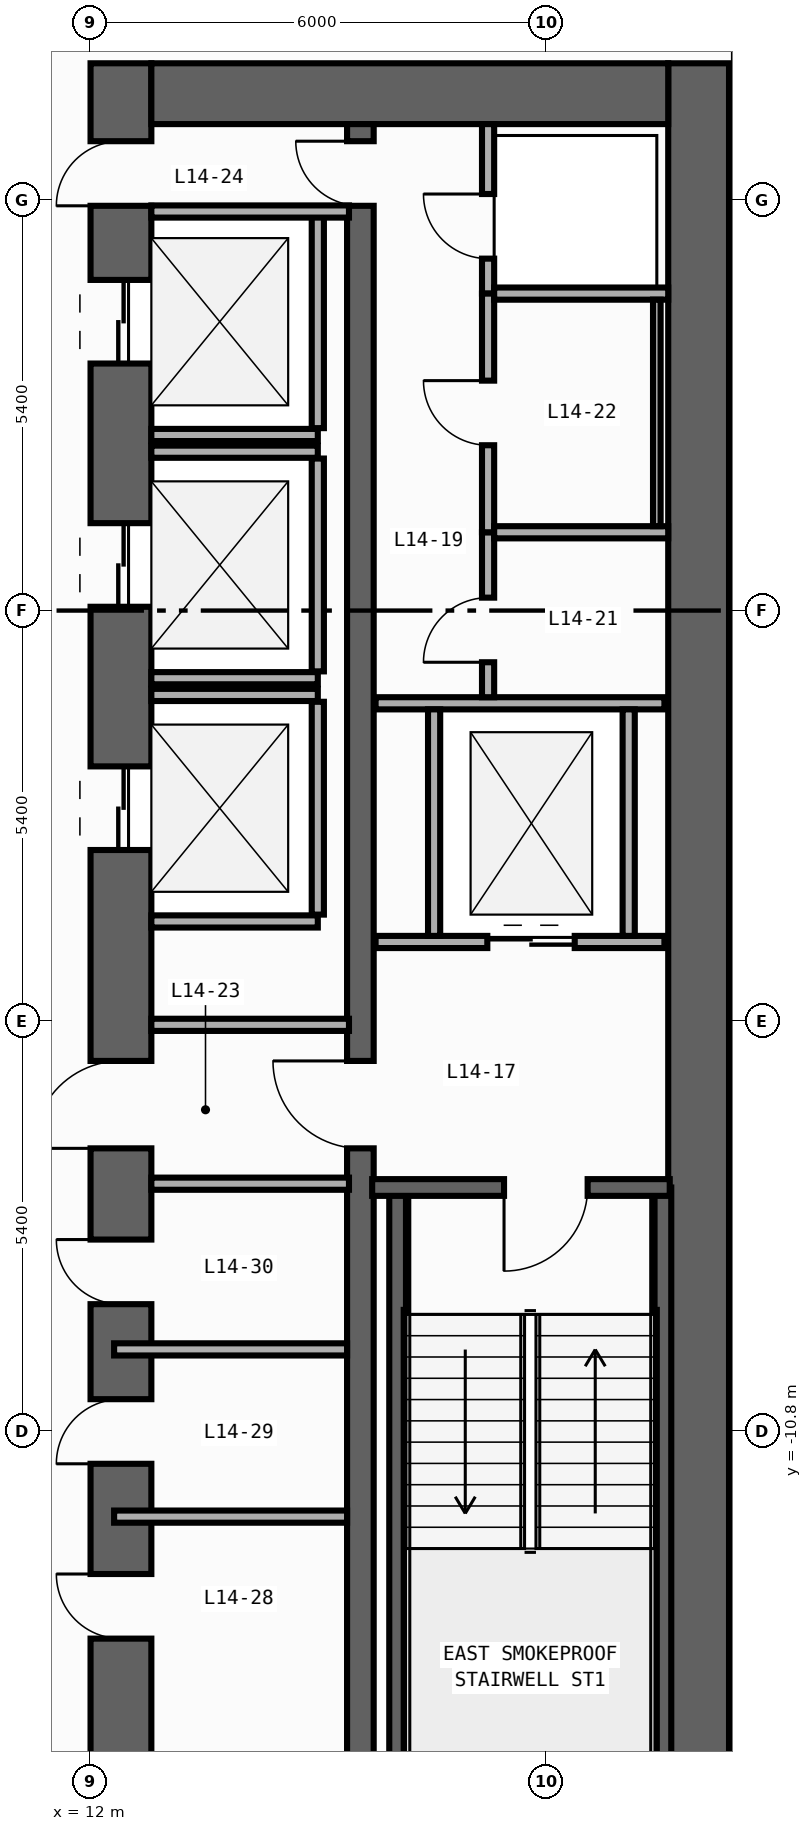
"""IFC4 building model, lengths in metres.
Left out: names, types, materials, properties, quantities, classifications, styles, units other than length and angle.
Written with IfcOpenShell. Run it as: python <this file> out.ifc"""

import sys

from ifc_helpers import new_model, si_unit, direction, frame, frame_2d, origin, place, context, subcontext, project, spatial, rectangle, extrude, element, fill, save


model = new_model("IFC4")
c1 = context("Model", 3, precision=1e-05, world=origin(), true_north=direction((0.0, 1.0)))
c2 = subcontext(c1, "Body", "Model", "MODEL_VIEW")
j1 = project(units=[si_unit("LENGTHUNIT", "METRE"), si_unit("PLANEANGLEUNIT", "RADIAN")], contexts=[c1])
p1 = place(None, origin())
s1 = spatial("IfcSite", under=j1, at=p1, CompositionType="ELEMENT")
p2 = place(p1, origin())
s2 = spatial("IfcBuilding", under=s1, at=p2, CompositionType="ELEMENT")
p3 = place(p2, frame((0.0, 0.0, 59.6)))
s3 = spatial("IfcBuildingStorey", under=s2, at=p3, CompositionType="ELEMENT", Elevation=59.6)
p4 = place(p3, frame((12.4, -19.8, 0.0), z_axis=(0.0, 0.0, 1.0), x_axis=(0.0, 1.0, 0.0)))
e1 = element("IfcWall", 1, at=p4, inside=s3, PredefinedType="SHEAR", context=c2, shape_type="SweptSolid", body=[
    extrude(rectangle(XDim=27.0, YDim=0.8, at=frame_2d((13.5, 0.0))), origin(), (0.0, 0.0, 1.0), 3.94),
])
p5 = place(p4, frame((23.05, 0.0, 0.0)))
e2 = element("IfcOpeningElement", 2, at=p5, cuts=e1, PredefinedType="OPENING", context=c2, shape_type="SweptSolid", body=[
    extrude(rectangle(XDim=1.1, YDim=2.2, at=frame_2d((0.55, 1.1))), frame((0.0, 0.41, 0.0), z_axis=(0.0, -1.0, 0.0), x_axis=(1.0, 0.0, 0.0)), (0.0, 0.0, 1.0), 0.82),
])
p6 = place(p4, frame((19.85, 0.0, 0.0)))
e3 = element("IfcOpeningElement", 3, at=p6, cuts=e1, PredefinedType="OPENING", context=c2, shape_type="SweptSolid", body=[
    extrude(rectangle(XDim=1.1, YDim=2.2, at=frame_2d((0.55, 1.1))), frame((0.0, 0.41, 0.0), z_axis=(0.0, -1.0, 0.0), x_axis=(1.0, 0.0, 0.0)), (0.0, 0.0, 1.0), 0.82),
])
p7 = place(p4, frame((16.65, 0.0, 0.0)))
e4 = element("IfcOpeningElement", 4, at=p7, cuts=e1, PredefinedType="OPENING", context=c2, shape_type="SweptSolid", body=[
    extrude(rectangle(XDim=1.1, YDim=2.2, at=frame_2d((0.55, 1.1))), frame((0.0, 0.41, 0.0), z_axis=(0.0, -1.0, 0.0), x_axis=(1.0, 0.0, 0.0)), (0.0, 0.0, 1.0), 0.82),
])
p8 = place(p4, frame((6.275, 0.0, 0.0)))
e5 = element("IfcOpeningElement", 5, at=p8, cuts=e1, PredefinedType="OPENING", context=c2, shape_type="SweptSolid", body=[
    extrude(rectangle(XDim=0.85, YDim=2.1, at=frame_2d((0.425, 1.05))), frame((0.0, 0.41, 0.0), z_axis=(0.0, -1.0, 0.0), x_axis=(1.0, 0.0, 0.0)), (0.0, 0.0, 1.0), 0.82),
])
p9 = place(p4, frame((8.575, 0.0, 0.0)))
e6 = element("IfcOpeningElement", 6, at=p9, cuts=e1, PredefinedType="OPENING", context=c2, shape_type="SweptSolid", body=[
    extrude(rectangle(XDim=0.85, YDim=2.1, at=frame_2d((0.425, 1.05))), frame((0.0, 0.41, 0.0), z_axis=(0.0, -1.0, 0.0), x_axis=(1.0, 0.0, 0.0)), (0.0, 0.0, 1.0), 0.82),
])
p10 = place(p4, frame((10.675, 0.0, 0.0)))
e7 = element("IfcOpeningElement", 7, at=p10, cuts=e1, PredefinedType="OPENING", context=c2, shape_type="SweptSolid", body=[
    extrude(rectangle(XDim=0.85, YDim=2.1, at=frame_2d((0.425, 1.05))), frame((0.0, 0.41, 0.0), z_axis=(0.0, -1.0, 0.0), x_axis=(1.0, 0.0, 0.0)), (0.0, 0.0, 1.0), 0.82),
])
p11 = place(p4, frame((12.725, 0.0, 0.0)))
e8 = element("IfcOpeningElement", 8, at=p11, cuts=e1, PredefinedType="OPENING", context=c2, shape_type="SweptSolid", body=[
    extrude(rectangle(XDim=1.15, YDim=2.2, at=frame_2d((0.575, 1.1))), frame((0.0, 0.41, 0.0), z_axis=(0.0, -1.0, 0.0), x_axis=(1.0, 0.0, 0.0)), (0.0, 0.0, 1.0), 0.82),
])
p12 = place(p4, frame((25.125, 0.0, 0.0)))
e9 = element("IfcOpeningElement", 9, at=p12, cuts=e1, PredefinedType="OPENING", context=c2, shape_type="SweptSolid", body=[
    extrude(rectangle(XDim=0.85, YDim=2.1, at=frame_2d((0.425, 1.05))), frame((0.0, 0.41, 0.0), z_axis=(0.0, -1.0, 0.0), x_axis=(1.0, 0.0, 0.0)), (0.0, 0.0, 1.0), 0.82),
])
p13 = place(p3, frame((20.0, -19.8, 0.0), z_axis=(0.0, 0.0, 1.0), x_axis=(0.0, 1.0, 0.0)))
e10 = element("IfcWall", 10, at=p13, inside=s3, PredefinedType="SHEAR", context=c2, shape_type="SweptSolid", body=[
    extrude(rectangle(XDim=27.0, YDim=0.8, at=frame_2d((13.5, 0.0))), origin(), (0.0, 0.0, 1.0), 3.94),
])
p14 = place(p3, frame((12.8, 6.8, 0.0), z_axis=(0.0, 0.0, 1.0), x_axis=(1.0, 0.0, 0.0)))
e11 = element("IfcWall", 11, at=p14, inside=s3, PredefinedType="SHEAR", context=c2, shape_type="SweptSolid", body=[
    extrude(rectangle(XDim=6.8, YDim=0.8, at=frame_2d((3.4, 0.0))), origin(), (0.0, 0.0, 1.0), 3.94),
])
p15 = place(p3, frame((15.55, -19.0, 0.0), z_axis=(0.0, 0.0, 1.0), x_axis=(0.0, 1.0, 0.0)))
e12 = element("IfcWall", 12, at=p15, inside=s3, PredefinedType="SHEAR", context=c2, shape_type="SweptSolid", body=[
    extrude(rectangle(XDim=25.4, YDim=0.35, at=frame_2d((12.7, 0.0))), origin(), (0.0, 0.0, 1.0), 3.94),
])
p16 = place(p15, frame((11.925, 0.0, 0.0)))
e13 = element("IfcOpeningElement", 13, at=p16, cuts=e12, PredefinedType="OPENING", context=c2, shape_type="SweptSolid", body=[
    extrude(rectangle(XDim=1.15, YDim=2.2, at=frame_2d((0.575, 1.1))), frame((0.0, 0.185, 0.0), z_axis=(0.0, -1.0, 0.0), x_axis=(1.0, 0.0, 0.0)), (0.0, 0.0, 1.0), 0.37),
])
p17 = place(p15, frame((24.325, 0.0, 0.0)))
e14 = element("IfcOpeningElement", 14, at=p17, cuts=e12, PredefinedType="OPENING", context=c2, shape_type="SweptSolid", body=[
    extrude(rectangle(XDim=0.85, YDim=2.1, at=frame_2d((0.425, 1.05))), frame((0.0, 0.185, 0.0), z_axis=(0.0, -1.0, 0.0), x_axis=(1.0, 0.0, 0.0)), (0.0, 0.0, 1.0), 0.37),
])
for number, where, z_axis, x_axis in (
    (15, (16.04, -18.89, 0.0), (0.0, 0.0, 1.0), (0.0, 1.0, 0.0)),
    (16, (19.53, -18.89, 0.0), (0.0, 0.0, 1.0), (0.0, 1.0, 0.0)),
):
    element("IfcWall", number, at=place(p3, frame(where, z_axis=z_axis, x_axis=x_axis)), inside=s3, PredefinedType="SHEAR", context=c2, shape_type="SweptSolid", body=[
        extrude(rectangle(XDim=11.3, YDim=0.22, at=frame_2d((5.65, 0.0))), origin(), (0.0, 0.0, 1.0), 3.94),
    ])
p18 = place(p3, frame((19.62, -7.59, 0.0), z_axis=(0.0, 0.0, 1.0), x_axis=(-1.0, 0.0, 0.0)))
e17 = element("IfcWall", 17, at=p18, inside=s3, PredefinedType="SHEAR", context=c2, shape_type="SweptSolid", body=[
    extrude(rectangle(XDim=3.915, YDim=0.22, at=frame_2d((1.958, 0.0))), origin(), (0.0, 0.0, 1.0), 3.94),
])
p19 = place(p18, frame((1.08, 0.0, 0.0)))
e18 = element("IfcOpeningElement", 18, at=p19, cuts=e17, PredefinedType="OPENING", context=c2, shape_type="SweptSolid", body=[
    extrude(rectangle(XDim=1.1, YDim=2.2, at=frame_2d((0.55, 1.1))), frame((0.0, 0.12, 0.0), z_axis=(0.0, -1.0, 0.0), x_axis=(1.0, 0.0, 0.0)), (0.0, 0.0, 1.0), 0.24),
])
p20 = place(p3, frame((12.8, 2.31, 0.0), z_axis=(0.0, 0.0, 1.0), x_axis=(1.0, 0.0, 0.0)))
e19 = element("IfcWall", 19, at=p20, inside=s3, PredefinedType="STANDARD", context=c2, shape_type="SweptSolid", body=[
    extrude(rectangle(XDim=2.19, YDim=0.16, at=frame_2d((1.095, 0.0))), origin(), (0.0, 0.0, 1.0), 3.94),
])
p21 = place(p3, frame((14.99, 2.4, 0.0), z_axis=(0.0, 0.0, 1.0), x_axis=(0.0, 1.0, 0.0)))
e20 = element("IfcWall", 20, at=p21, inside=s3, PredefinedType="STANDARD", context=c2, shape_type="SweptSolid", body=[
    extrude(rectangle(XDim=2.8, YDim=0.16, at=frame_2d((1.4, 0.0))), origin(), (0.0, 0.0, 1.0), 3.94),
])
for number, where, z_axis, x_axis in (
    (21, (12.8, -0.89, 0.0), (0.0, 0.0, 1.0), (1.0, 0.0, 0.0)),
    (22, (12.8, 2.09, 0.0), (0.0, 0.0, 1.0), (1.0, 0.0, 0.0)),
):
    element("IfcWall", number, at=place(p3, frame(where, z_axis=z_axis, x_axis=x_axis)), inside=s3, PredefinedType="STANDARD", context=c2, shape_type="SweptSolid", body=[
        extrude(rectangle(XDim=2.19, YDim=0.16, at=frame_2d((1.095, 0.0))), origin(), (0.0, 0.0, 1.0), 3.94),
    ])
p22 = place(p3, frame((14.99, -0.8, 0.0), z_axis=(0.0, 0.0, 1.0), x_axis=(0.0, 1.0, 0.0)))
e23 = element("IfcWall", 23, at=p22, inside=s3, PredefinedType="STANDARD", context=c2, shape_type="SweptSolid", body=[
    extrude(rectangle(XDim=2.8, YDim=0.16, at=frame_2d((1.4, 0.0))), origin(), (0.0, 0.0, 1.0), 3.94),
])
for number, where, z_axis, x_axis in (
    (24, (12.8, -4.09, 0.0), (0.0, 0.0, 1.0), (1.0, 0.0, 0.0)),
    (25, (12.8, -1.11, 0.0), (0.0, 0.0, 1.0), (1.0, 0.0, 0.0)),
):
    element("IfcWall", number, at=place(p3, frame(where, z_axis=z_axis, x_axis=x_axis)), inside=s3, PredefinedType="STANDARD", context=c2, shape_type="SweptSolid", body=[
        extrude(rectangle(XDim=2.19, YDim=0.16, at=frame_2d((1.095, 0.0))), origin(), (0.0, 0.0, 1.0), 3.94),
    ])
p23 = place(p3, frame((14.99, -4.0, 0.0), z_axis=(0.0, 0.0, 1.0), x_axis=(0.0, 1.0, 0.0)))
e26 = element("IfcWall", 26, at=p23, inside=s3, PredefinedType="STANDARD", context=c2, shape_type="SweptSolid", body=[
    extrude(rectangle(XDim=2.8, YDim=0.16, at=frame_2d((1.4, 0.0))), origin(), (0.0, 0.0, 1.0), 3.94),
])
p24 = place(p3, frame((15.75, -4.36, 0.0), z_axis=(0.0, 0.0, 1.0), x_axis=(1.0, 0.0, 0.0)))
e27 = element("IfcWall", 27, at=p24, inside=s3, PredefinedType="STANDARD", context=c2, shape_type="SweptSolid", body=[
    extrude(rectangle(XDim=3.8, YDim=0.16, at=frame_2d((1.9, 0.0))), origin(), (0.0, 0.0, 1.0), 3.94),
])
p25 = place(p24, frame((1.47, 0.0, 0.0)))
e28 = element("IfcOpeningElement", 28, at=p25, cuts=e27, PredefinedType="OPENING", context=c2, shape_type="SweptSolid", body=[
    extrude(rectangle(XDim=1.15, YDim=2.2, at=frame_2d((0.575, 1.1))), frame((0.0, 0.09, 0.0), z_axis=(0.0, -1.0, 0.0), x_axis=(1.0, 0.0, 0.0)), (0.0, 0.0, 1.0), 0.18),
])
p26 = place(p3, frame((15.75, -1.22, 0.0), z_axis=(0.0, 0.0, 1.0), x_axis=(1.0, 0.0, 0.0)))
e29 = element("IfcWall", 29, at=p26, inside=s3, PredefinedType="STANDARD", context=c2, shape_type="SweptSolid", body=[
    extrude(rectangle(XDim=3.8, YDim=0.16, at=frame_2d((1.9, 0.0))), origin(), (0.0, 0.0, 1.0), 3.94),
])
for number, where, z_axis, x_axis in (
    (30, (16.52, -4.28, 0.0), (0.0, 0.0, 1.0), (0.0, 1.0, 0.0)),
    (31, (19.08, -4.28, 0.0), (0.0, 0.0, 1.0), (0.0, 1.0, 0.0)),
):
    element("IfcWall", number, at=place(p3, frame(where, z_axis=z_axis, x_axis=x_axis)), inside=s3, PredefinedType="STANDARD", context=c2, shape_type="SweptSolid", body=[
        extrude(rectangle(XDim=2.98, YDim=0.16, at=frame_2d((1.49, 0.0))), origin(), (0.0, 0.0, 1.0), 3.94),
    ])
for number, where, z_axis, x_axis in (
    (32, (12.8, -5.45, 0.0), (0.0, 0.0, 1.0), (1.0, 0.0, 0.0)),
    (33, (12.8, -7.54, 0.0), (0.0, 0.0, 1.0), (1.0, 0.0, 0.0)),
    (34, (12.8, 5.25, 0.0), (0.0, 0.0, 1.0), (1.0, 0.0, 0.0)),
):
    element("IfcWall", number, at=place(p3, frame(where, z_axis=z_axis, x_axis=x_axis)), inside=s3, PredefinedType="STANDARD", context=c2, shape_type="SweptSolid", body=[
        extrude(rectangle(XDim=2.6, YDim=0.16, at=frame_2d((1.3, 0.0))), origin(), (0.0, 0.0, 1.0), 3.94),
    ])
p27 = place(p3, frame((17.23, 4.17, 0.0), z_axis=(0.0, 0.0, 1.0), x_axis=(0.0, 1.0, 0.0)))
e35 = element("IfcWall", 35, at=p27, inside=s3, PredefinedType="PARTITIONING", context=c2, shape_type="SweptSolid", body=[
    extrude(rectangle(XDim=2.23, YDim=0.16, at=frame_2d((1.115, 0.0))), origin(), (0.0, 0.0, 1.0), 3.94),
])
p28 = place(p27, frame((0.46, 0.0, 0.0)))
e36 = element("IfcOpeningElement", 36, at=p28, cuts=e35, PredefinedType="OPENING", context=c2, shape_type="SweptSolid", body=[
    extrude(rectangle(XDim=0.85, YDim=2.1, at=frame_2d((0.425, 1.05))), frame((0.0, 0.09, 0.0), z_axis=(0.0, -1.0, 0.0), x_axis=(1.0, 0.0, 0.0)), (0.0, 0.0, 1.0), 0.18),
])
p29 = place(p3, frame((17.23, -1.14, 0.0), z_axis=(0.0, 0.0, 1.0), x_axis=(0.0, 1.0, 0.0)))
e37 = element("IfcWall", 37, at=p29, inside=s3, PredefinedType="PARTITIONING", context=c2, shape_type="SweptSolid", body=[
    extrude(rectangle(XDim=2.17, YDim=0.16, at=frame_2d((1.085, 0.0))), origin(), (0.0, 0.0, 1.0), 3.94),
])
p30 = place(p29, frame((0.46, 0.0, 0.0)))
e38 = element("IfcOpeningElement", 38, at=p30, cuts=e37, PredefinedType="OPENING", context=c2, shape_type="SweptSolid", body=[
    extrude(rectangle(XDim=0.85, YDim=2.1, at=frame_2d((0.425, 1.05))), frame((0.0, 0.09, 0.0), z_axis=(0.0, -1.0, 0.0), x_axis=(1.0, 0.0, 0.0)), (0.0, 0.0, 1.0), 0.18),
])
p31 = place(p3, frame((17.23, 1.03, 0.0), z_axis=(0.0, 0.0, 1.0), x_axis=(0.0, 1.0, 0.0)))
e39 = element("IfcWall", 39, at=p31, inside=s3, PredefinedType="PARTITIONING", context=c2, shape_type="SweptSolid", body=[
    extrude(rectangle(XDim=3.14, YDim=0.16, at=frame_2d((1.57, 0.0))), origin(), (0.0, 0.0, 1.0), 3.94),
])
p32 = place(p31, frame((1.145, 0.0, 0.0)))
e40 = element("IfcOpeningElement", 40, at=p32, cuts=e39, PredefinedType="OPENING", context=c2, shape_type="SweptSolid", body=[
    extrude(rectangle(XDim=0.85, YDim=2.1, at=frame_2d((0.425, 1.05))), frame((0.0, 0.09, 0.0), z_axis=(0.0, -1.0, 0.0), x_axis=(1.0, 0.0, 0.0)), (0.0, 0.0, 1.0), 0.18),
])
for number, where, z_axis, x_axis in (
    (41, (17.31, 4.17, 0.0), (0.0, 0.0, 1.0), (1.0, 0.0, 0.0)),
    (42, (17.31, 1.03, 0.0), (0.0, 0.0, 1.0), (1.0, 0.0, 0.0)),
):
    element("IfcWall", number, at=place(p3, frame(where, z_axis=z_axis, x_axis=x_axis)), inside=s3, PredefinedType="PARTITIONING", context=c2, shape_type="SweptSolid", body=[
        extrude(rectangle(XDim=2.29, YDim=0.16, at=frame_2d((1.145, 0.0))), origin(), (0.0, 0.0, 1.0), 3.94),
    ])
for number, where, z_axis, x_axis in (
    (43, (12.31, -11.92, 0.0), (0.0, 0.0, 1.0), (1.0, 0.0, 0.0)),
    (44, (12.31, -9.72, 0.0), (0.0, 0.0, 1.0), (1.0, 0.0, 0.0)),
):
    element("IfcWall", number, at=place(p3, frame(where, z_axis=z_axis, x_axis=x_axis)), inside=s3, PredefinedType="PARTITIONING", context=c2, shape_type="SweptSolid", body=[
        extrude(rectangle(XDim=3.065, YDim=0.16, at=frame_2d((1.532, 0.0))), origin(), (0.0, 0.0, 1.0), 3.94),
    ])
p33 = place(p3, frame((19.45, 4.09, 0.0), z_axis=(0.0, 0.0, 1.0), x_axis=(0.0, -1.0, 0.0)))
e45 = element("IfcWall", 45, at=p33, inside=s3, PredefinedType="PARTITIONING", context=c2, shape_type="SweptSolid", body=[
    extrude(rectangle(XDim=2.98, YDim=0.1, at=frame_2d((1.49, 0.0))), origin(), (0.0, 0.0, 1.0), 3.94),
])
p34 = place(p19, origin())
e46 = element("IfcDoor", 46, at=p34, inside=s3, OperationType="SINGLE_SWING_RIGHT", PredefinedType="DOOR", context=c2, shape_type="SweptSolid", body=[
    extrude(rectangle(XDim=1.1, YDim=2.2, at=frame_2d((0.55, 1.1))), frame((0.0, 0.025, 0.0), z_axis=(0.0, -1.0, 0.0), x_axis=(1.0, 0.0, 0.0)), (0.0, 0.0, 1.0), 0.05),
])
fill(e18, e46)
p35 = place(p5, origin())
e47 = element("IfcDoor", 47, at=p35, inside=s3, OperationType="DOUBLE_DOOR_SLIDING", PredefinedType="DOOR", context=c2, shape_type="SweptSolid", body=[
    extrude(rectangle(XDim=1.1, YDim=2.2, at=frame_2d((0.55, 1.1))), frame((0.0, 0.025, 0.0), z_axis=(0.0, -1.0, 0.0), x_axis=(1.0, 0.0, 0.0)), (0.0, 0.0, 1.0), 0.05),
])
fill(e2, e47)
p36 = place(p6, origin())
e48 = element("IfcDoor", 48, at=p36, inside=s3, OperationType="DOUBLE_DOOR_SLIDING", PredefinedType="DOOR", context=c2, shape_type="SweptSolid", body=[
    extrude(rectangle(XDim=1.1, YDim=2.2, at=frame_2d((0.55, 1.1))), frame((0.0, 0.025, 0.0), z_axis=(0.0, -1.0, 0.0), x_axis=(1.0, 0.0, 0.0)), (0.0, 0.0, 1.0), 0.05),
])
fill(e3, e48)
p37 = place(p7, origin())
e49 = element("IfcDoor", 49, at=p37, inside=s3, OperationType="DOUBLE_DOOR_SLIDING", PredefinedType="DOOR", context=c2, shape_type="SweptSolid", body=[
    extrude(rectangle(XDim=1.1, YDim=2.2, at=frame_2d((0.55, 1.1))), frame((0.0, 0.025, 0.0), z_axis=(0.0, -1.0, 0.0), x_axis=(1.0, 0.0, 0.0)), (0.0, 0.0, 1.0), 0.05),
])
fill(e4, e49)
p38 = place(p8, origin())
e50 = element("IfcDoor", 50, at=p38, inside=s3, OperationType="SINGLE_SWING_RIGHT", PredefinedType="DOOR", context=c2, shape_type="SweptSolid", body=[
    extrude(rectangle(XDim=0.85, YDim=2.1, at=frame_2d((0.425, 1.05))), frame((0.0, 0.025, 0.0), z_axis=(0.0, -1.0, 0.0), x_axis=(1.0, 0.0, 0.0)), (0.0, 0.0, 1.0), 0.05),
])
fill(e5, e50)
p39 = place(p9, origin())
e51 = element("IfcDoor", 51, at=p39, inside=s3, OperationType="SINGLE_SWING_LEFT", PredefinedType="DOOR", context=c2, shape_type="SweptSolid", body=[
    extrude(rectangle(XDim=0.85, YDim=2.1, at=frame_2d((0.425, 1.05))), frame((0.0, 0.025, 0.0), z_axis=(0.0, -1.0, 0.0), x_axis=(1.0, 0.0, 0.0)), (0.0, 0.0, 1.0), 0.05),
])
fill(e6, e51)
p40 = place(p10, origin())
e52 = element("IfcDoor", 52, at=p40, inside=s3, OperationType="SINGLE_SWING_RIGHT", PredefinedType="DOOR", context=c2, shape_type="SweptSolid", body=[
    extrude(rectangle(XDim=0.85, YDim=2.1, at=frame_2d((0.425, 1.05))), frame((0.0, 0.025, 0.0), z_axis=(0.0, -1.0, 0.0), x_axis=(1.0, 0.0, 0.0)), (0.0, 0.0, 1.0), 0.05),
])
fill(e7, e52)
p41 = place(p11, origin())
e53 = element("IfcDoor", 53, at=p41, inside=s3, OperationType="SINGLE_SWING_LEFT", PredefinedType="DOOR", context=c2, shape_type="SweptSolid", body=[
    extrude(rectangle(XDim=1.15, YDim=2.2, at=frame_2d((0.575, 1.1))), frame((0.0, 0.025, 0.0), z_axis=(0.0, -1.0, 0.0), x_axis=(1.0, 0.0, 0.0)), (0.0, 0.0, 1.0), 0.05),
])
fill(e8, e53)
p42 = place(p16, origin())
e54 = element("IfcDoor", 54, at=p42, inside=s3, OperationType="SINGLE_SWING_RIGHT", PredefinedType="DOOR", context=c2, shape_type="SweptSolid", body=[
    extrude(rectangle(XDim=1.15, YDim=2.2, at=frame_2d((0.575, 1.1))), frame((0.0, 0.025, 0.0), z_axis=(0.0, -1.0, 0.0), x_axis=(1.0, 0.0, 0.0)), (0.0, 0.0, 1.0), 0.05),
])
fill(e13, e54)
p43 = place(p12, origin())
e55 = element("IfcDoor", 55, at=p43, inside=s3, OperationType="SINGLE_SWING_LEFT", PredefinedType="DOOR", context=c2, shape_type="SweptSolid", body=[
    extrude(rectangle(XDim=0.85, YDim=2.1, at=frame_2d((0.425, 1.05))), frame((0.0, 0.025, 0.0), z_axis=(0.0, -1.0, 0.0), x_axis=(1.0, 0.0, 0.0)), (0.0, 0.0, 1.0), 0.05),
])
fill(e9, e55)
p44 = place(p17, origin())
e56 = element("IfcDoor", 56, at=p44, inside=s3, OperationType="SINGLE_SWING_RIGHT", PredefinedType="DOOR", context=c2, shape_type="SweptSolid", body=[
    extrude(rectangle(XDim=0.85, YDim=2.1, at=frame_2d((0.425, 1.05))), frame((0.0, 0.025, 0.0), z_axis=(0.0, -1.0, 0.0), x_axis=(1.0, 0.0, 0.0)), (0.0, 0.0, 1.0), 0.05),
])
fill(e14, e56)
p45 = place(p25, origin())
e57 = element("IfcDoor", 57, at=p45, inside=s3, OperationType="DOUBLE_DOOR_SLIDING", PredefinedType="DOOR", context=c2, shape_type="SweptSolid", body=[
    extrude(rectangle(XDim=1.15, YDim=2.2, at=frame_2d((0.575, 1.1))), frame((0.0, 0.025, 0.0), z_axis=(0.0, -1.0, 0.0), x_axis=(1.0, 0.0, 0.0)), (0.0, 0.0, 1.0), 0.05),
])
fill(e28, e57)
p46 = place(p28, origin())
e58 = element("IfcDoor", 58, at=p46, inside=s3, OperationType="SINGLE_SWING_RIGHT", PredefinedType="DOOR", context=c2, shape_type="SweptSolid", body=[
    extrude(rectangle(XDim=0.85, YDim=2.1, at=frame_2d((0.425, 1.05))), frame((0.0, 0.025, 0.0), z_axis=(0.0, -1.0, 0.0), x_axis=(1.0, 0.0, 0.0)), (0.0, 0.0, 1.0), 0.05),
])
fill(e36, e58)
p47 = place(p30, origin())
e59 = element("IfcDoor", 59, at=p47, inside=s3, OperationType="SINGLE_SWING_LEFT", PredefinedType="DOOR", context=c2, shape_type="SweptSolid", body=[
    extrude(rectangle(XDim=0.85, YDim=2.1, at=frame_2d((0.425, 1.05))), frame((0.0, 0.025, 0.0), z_axis=(0.0, -1.0, 0.0), x_axis=(1.0, 0.0, 0.0)), (0.0, 0.0, 1.0), 0.05),
])
fill(e38, e59)
p48 = place(p32, origin())
e60 = element("IfcDoor", 60, at=p48, inside=s3, OperationType="SINGLE_SWING_RIGHT", PredefinedType="DOOR", context=c2, shape_type="SweptSolid", body=[
    extrude(rectangle(XDim=0.85, YDim=2.1, at=frame_2d((0.425, 1.05))), frame((0.0, 0.025, 0.0), z_axis=(0.0, -1.0, 0.0), x_axis=(1.0, 0.0, 0.0)), (0.0, 0.0, 1.0), 0.05),
])
fill(e40, e60)
save(model, sys.argv[1])
